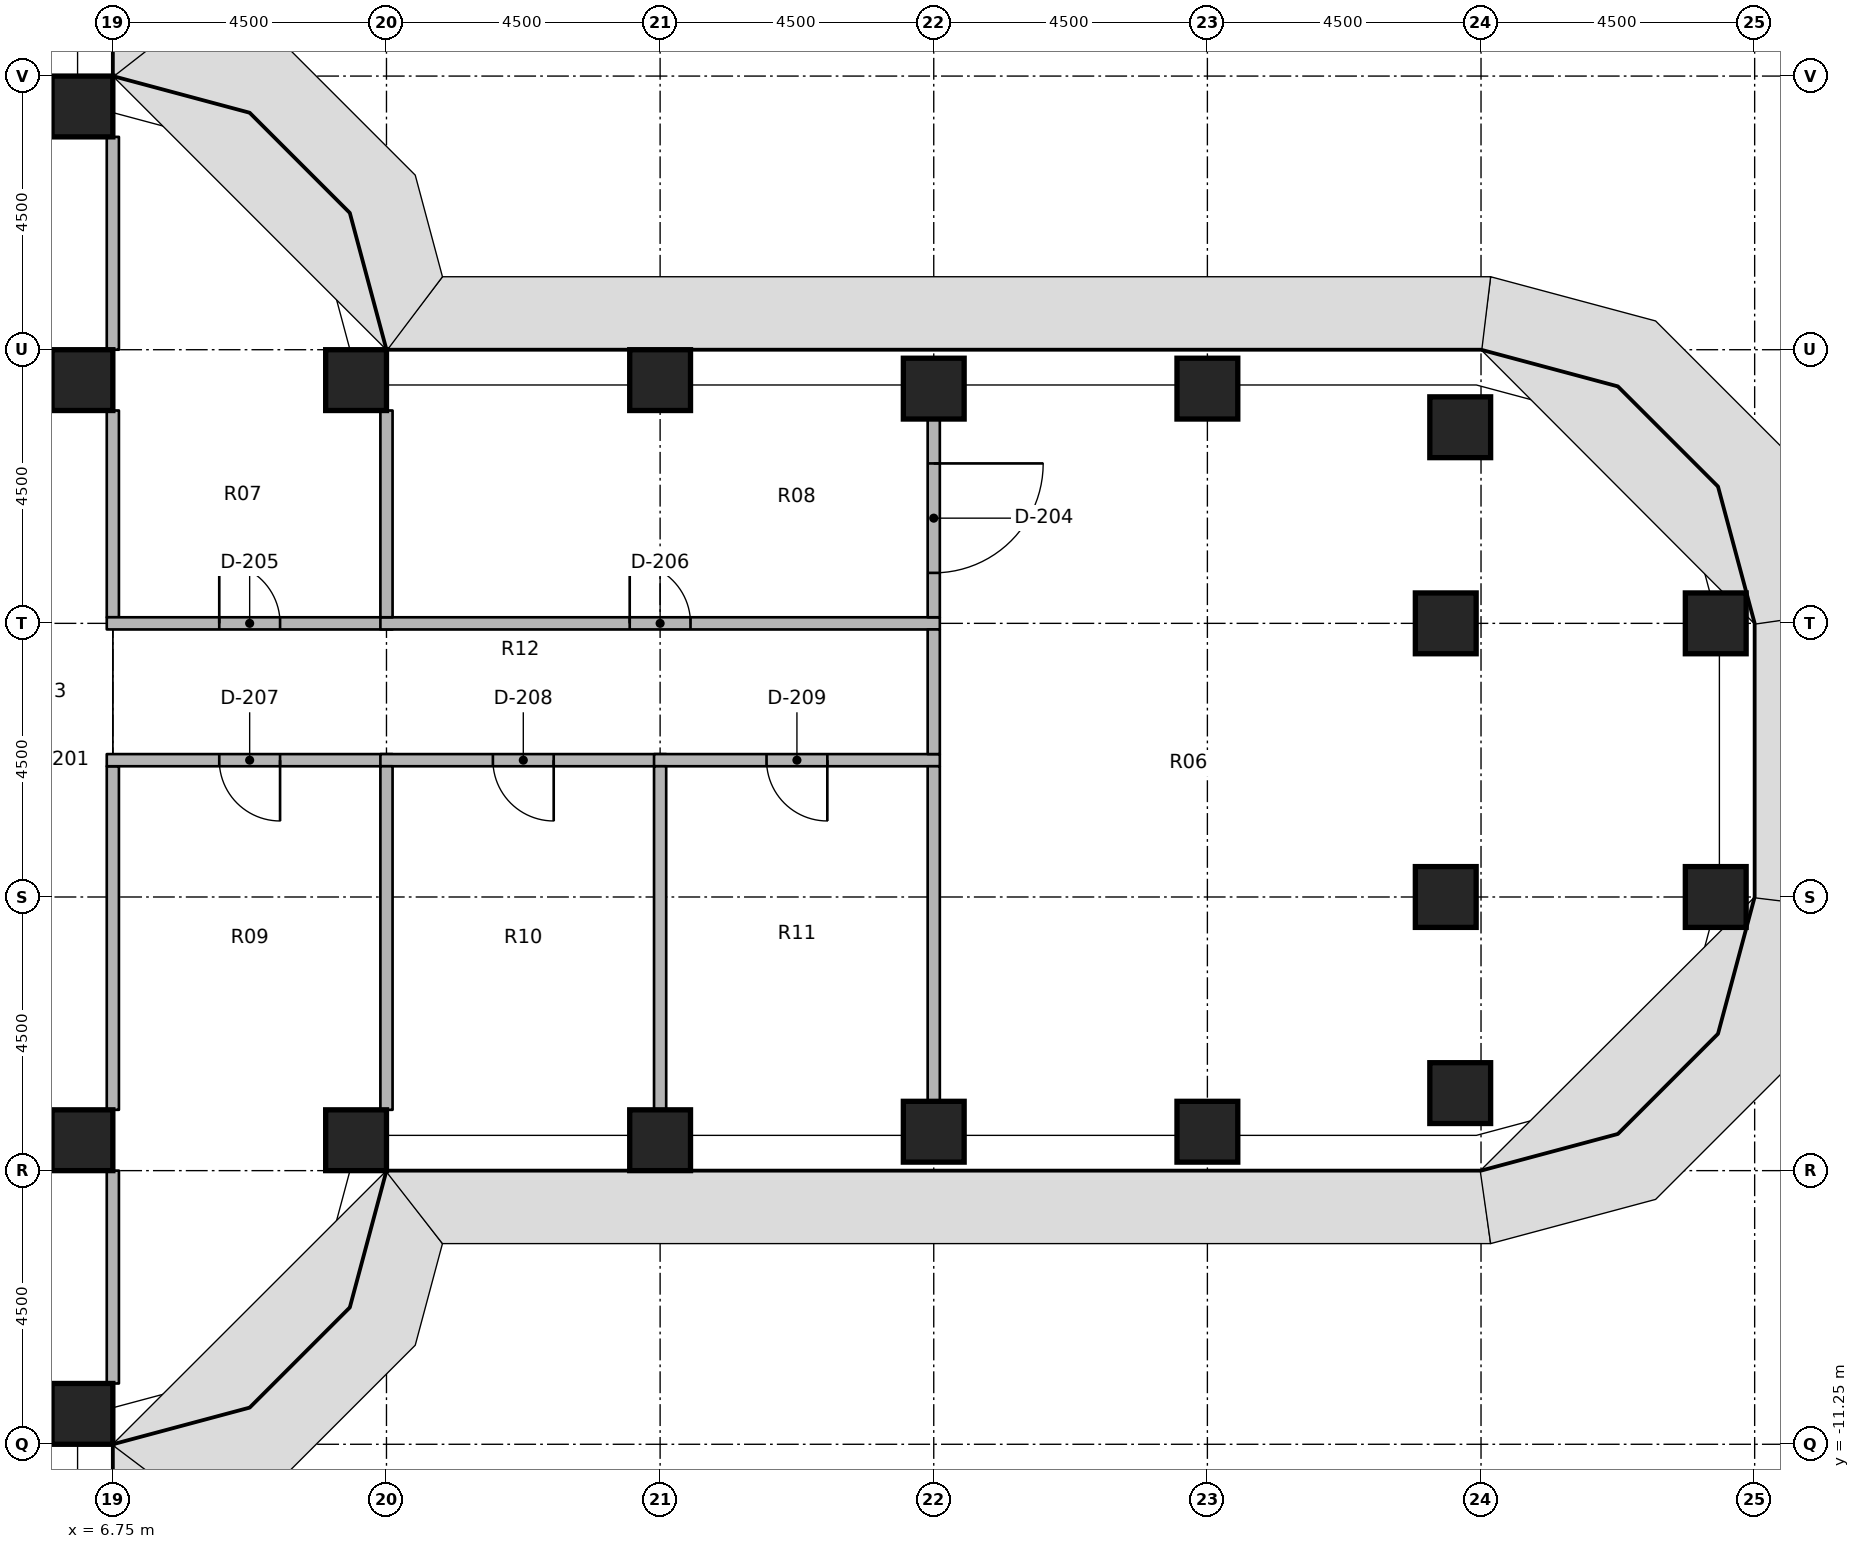
"""IFC4 building model, lengths in metres.
Left out: names, types, materials, properties, quantities, classifications, styles, units other than length and angle.
Written with IfcOpenShell. Run it as: python <this file> out.ifc"""

import sys

from ifc_helpers import new_model, si_unit, direction, frame, frame_2d, origin, origin_2d, place, context, subcontext, project, spatial, rectangle, extrude, element, fill, save


model = new_model("IFC4")
c1 = context("Model", 3, precision=1e-05, world=origin(), true_north=direction((0.0, 1.0)))
c2 = subcontext(c1, "Body", "Model", "MODEL_VIEW")
j1 = project(units=[si_unit("LENGTHUNIT", "METRE"), si_unit("PLANEANGLEUNIT", "RADIAN")], contexts=[c1])
p1 = place(None, origin())
s1 = spatial("IfcSite", under=j1, at=p1, CompositionType="ELEMENT")
p2 = place(p1, origin())
s2 = spatial("IfcBuilding", under=s1, at=p2, CompositionType="ELEMENT")
p3 = place(p2, frame((0.0, 0.0, 31.2)))
s3 = spatial("IfcBuildingStorey", under=s2, at=p3, CompositionType="ELEMENT", Elevation=31.2)
for number, where, z_axis, x_axis in (
    (1, (6.25, -10.75, 0.0), (0.0, 0.0, 1.0), (1.0, 0.0, 0.0)),
    (2, (6.25, -6.25, 0.0), (0.0, 0.0, 1.0), (1.0, 0.0, 0.0)),
    (3, (6.25, 6.25, 0.0), (0.0, 0.0, 1.0), (1.0, 0.0, 0.0)),
    (4, (6.25, 10.75, 0.0), (0.0, 0.0, 1.0), (1.0, 0.0, 0.0)),
    (5, (10.75, -6.25, 0.0), (0.0, 0.0, 1.0), (1.0, 0.0, 0.0)),
    (6, (10.75, 6.25, 0.0), (0.0, 0.0, 1.0), (1.0, 0.0, 0.0)),
    (7, (15.75, -6.25, 0.0), (0.0, 0.0, 1.0), (1.0, 0.0, 0.0)),
    (8, (15.75, 6.25, 0.0), (0.0, 0.0, 1.0), (1.0, 0.0, 0.0)),
    (9, (20.25, -6.11, 0.0), (0.0, 0.0, 1.0), (1.0, 0.0, 0.0)),
    (10, (20.25, 6.11, 0.0), (0.0, 0.0, 1.0), (1.0, 0.0, 0.0)),
    (11, (24.75, -6.11, 0.0), (0.0, 0.0, 1.0), (1.0, 0.0, 0.0)),
    (12, (24.75, 6.11, 0.0), (0.0, 0.0, 1.0), (1.0, 0.0, 0.0)),
    (13, (28.908, -5.475, 0.0), (0.0, 0.0, 1.0), (1.0, 0.0, 0.0)),
    (14, (28.67, -2.25, 0.0), (0.0, 0.0, 1.0), (1.0, 0.0, 0.0)),
    (15, (28.67, 2.25, 0.0), (0.0, 0.0, 1.0), (1.0, 0.0, 0.0)),
    (16, (28.908, 5.475, 0.0), (0.0, 0.0, 1.0), (1.0, 0.0, 0.0)),
    (17, (33.11, -2.25, 0.0), (0.0, 0.0, 1.0), (1.0, 0.0, 0.0)),
    (18, (33.11, 2.25, 0.0), (0.0, 0.0, 1.0), (1.0, 0.0, 0.0)),
):
    element("IfcColumn", number, at=place(p3, frame(where, z_axis=z_axis, x_axis=x_axis)), inside=s3, PredefinedType="COLUMN", context=c2, shape_type="SweptSolid", body=[
        extrude(rectangle(XDim=1.0, YDim=1.0, at=origin_2d()), origin(), (0.0, 0.0, 1.0), 4.05),
    ])
p4 = place(p3, frame((6.75, 2.35, 0.0), z_axis=(0.0, 0.0, 1.0), x_axis=(0.0, 1.0, 0.0)))
e19 = element("IfcWall", 19, at=p4, inside=s3, PredefinedType="PARTITIONING", context=c2, shape_type="SweptSolid", body=[
    extrude(rectangle(XDim=3.4, YDim=0.2, at=frame_2d((1.7, 0.0))), origin(), (0.0, 0.0, 1.0), 3.131),
])
for number, where, z_axis, x_axis in (
    (20, (6.75, 6.75, 0.0), (0.0, 0.0, 1.0), (0.0, 1.0, 0.0)),
    (21, (6.75, -10.25, 0.0), (0.0, 0.0, 1.0), (0.0, 1.0, 0.0)),
):
    element("IfcWall", number, at=place(p3, frame(where, z_axis=z_axis, x_axis=x_axis)), inside=s3, PredefinedType="PARTITIONING", context=c2, shape_type="SweptSolid", body=[
        extrude(rectangle(XDim=3.5, YDim=0.2, at=frame_2d((1.75, 0.0))), origin(), (0.0, 0.0, 1.0), 3.131),
    ])
p5 = place(p3, frame((6.75, -5.75, 0.0), z_axis=(0.0, 0.0, 1.0), x_axis=(0.0, 1.0, 0.0)))
e22 = element("IfcWall", 22, at=p5, inside=s3, PredefinedType="PARTITIONING", context=c2, shape_type="SweptSolid", body=[
    extrude(rectangle(XDim=5.65, YDim=0.2, at=frame_2d((2.825, 0.0))), origin(), (0.0, 0.0, 1.0), 3.131),
])
p6 = place(p3, frame((6.65, 2.25, 0.0), z_axis=(0.0, 0.0, 1.0), x_axis=(1.0, 0.0, 0.0)))
e23 = element("IfcWall", 23, at=p6, inside=s3, PredefinedType="PARTITIONING", context=c2, shape_type="SweptSolid", body=[
    extrude(rectangle(XDim=4.7, YDim=0.2, at=frame_2d((2.35, 0.0))), origin(), (0.0, 0.0, 1.0), 3.131),
])
p7 = place(p6, frame((1.85, 0.0, 0.0)))
e24 = element("IfcOpeningElement", 24, at=p7, cuts=e23, PredefinedType="OPENING", context=c2, shape_type="SweptSolid", body=[
    extrude(rectangle(XDim=1.0, YDim=2.1, at=frame_2d((0.5, 1.05))), frame((0.0, 0.11, 0.0), z_axis=(0.0, -1.0, 0.0), x_axis=(1.0, 0.0, 0.0)), (0.0, 0.0, 1.0), 0.22),
])
p8 = place(p3, frame((11.35, 0.0, 0.0), z_axis=(0.0, 0.0, 1.0), x_axis=(-1.0, 0.0, 0.0)))
e25 = element("IfcWall", 25, at=p8, inside=s3, PredefinedType="PARTITIONING", context=c2, shape_type="SweptSolid", body=[
    extrude(rectangle(XDim=4.7, YDim=0.2, at=frame_2d((2.35, 0.0))), origin(), (0.0, 0.0, 1.0), 3.131),
])
p9 = place(p8, frame((1.85, 0.0, 0.0)))
e26 = element("IfcOpeningElement", 26, at=p9, cuts=e25, PredefinedType="OPENING", context=c2, shape_type="SweptSolid", body=[
    extrude(rectangle(XDim=1.0, YDim=2.1, at=frame_2d((0.5, 1.05))), frame((0.0, 0.11, 0.0), z_axis=(0.0, -1.0, 0.0), x_axis=(1.0, 0.0, 0.0)), (0.0, 0.0, 1.0), 0.22),
])
p10 = place(p3, frame((11.15, 2.25, 0.0), z_axis=(0.0, 0.0, 1.0), x_axis=(1.0, 0.0, 0.0)))
e27 = element("IfcWall", 27, at=p10, inside=s3, PredefinedType="PARTITIONING", context=c2, shape_type="SweptSolid", body=[
    extrude(rectangle(XDim=9.2, YDim=0.2, at=frame_2d((4.6, 0.0))), origin(), (0.0, 0.0, 1.0), 3.131),
])
p11 = place(p10, frame((4.1, 0.0, 0.0)))
e28 = element("IfcOpeningElement", 28, at=p11, cuts=e27, PredefinedType="OPENING", context=c2, shape_type="SweptSolid", body=[
    extrude(rectangle(XDim=1.0, YDim=2.1, at=frame_2d((0.5, 1.05))), frame((0.0, 0.11, 0.0), z_axis=(0.0, -1.0, 0.0), x_axis=(1.0, 0.0, 0.0)), (0.0, 0.0, 1.0), 0.22),
])
p12 = place(p3, frame((15.85, 0.0, 0.0), z_axis=(0.0, 0.0, 1.0), x_axis=(-1.0, 0.0, 0.0)))
e29 = element("IfcWall", 29, at=p12, inside=s3, PredefinedType="PARTITIONING", context=c2, shape_type="SweptSolid", body=[
    extrude(rectangle(XDim=4.7, YDim=0.2, at=frame_2d((2.35, 0.0))), origin(), (0.0, 0.0, 1.0), 3.131),
])
p13 = place(p12, frame((1.85, 0.0, 0.0)))
e30 = element("IfcOpeningElement", 30, at=p13, cuts=e29, PredefinedType="OPENING", context=c2, shape_type="SweptSolid", body=[
    extrude(rectangle(XDim=1.0, YDim=2.1, at=frame_2d((0.5, 1.05))), frame((0.0, 0.11, 0.0), z_axis=(0.0, -1.0, 0.0), x_axis=(1.0, 0.0, 0.0)), (0.0, 0.0, 1.0), 0.22),
])
p14 = place(p3, frame((20.35, 0.0, 0.0), z_axis=(0.0, 0.0, 1.0), x_axis=(-1.0, 0.0, 0.0)))
e31 = element("IfcWall", 31, at=p14, inside=s3, PredefinedType="PARTITIONING", context=c2, shape_type="SweptSolid", body=[
    extrude(rectangle(XDim=4.7, YDim=0.2, at=frame_2d((2.35, 0.0))), origin(), (0.0, 0.0, 1.0), 3.131),
])
p15 = place(p14, frame((1.85, 0.0, 0.0)))
e32 = element("IfcOpeningElement", 32, at=p15, cuts=e31, PredefinedType="OPENING", context=c2, shape_type="SweptSolid", body=[
    extrude(rectangle(XDim=1.0, YDim=2.1, at=frame_2d((0.5, 1.05))), frame((0.0, 0.11, 0.0), z_axis=(0.0, -1.0, 0.0), x_axis=(1.0, 0.0, 0.0)), (0.0, 0.0, 1.0), 0.22),
])
p16 = place(p3, frame((20.25, 0.1, 0.0), z_axis=(0.0, 0.0, 1.0), x_axis=(0.0, 1.0, 0.0)))
e33 = element("IfcWall", 33, at=p16, inside=s3, PredefinedType="PARTITIONING", context=c2, shape_type="SweptSolid", body=[
    extrude(rectangle(XDim=2.05, YDim=0.2, at=frame_2d((1.025, 0.0))), origin(), (0.0, 0.0, 1.0), 3.131),
])
p17 = place(p3, frame((11.25, 2.35, 0.0), z_axis=(0.0, 0.0, 1.0), x_axis=(0.0, 1.0, 0.0)))
e34 = element("IfcWall", 34, at=p17, inside=s3, PredefinedType="PARTITIONING", context=c2, shape_type="SweptSolid", body=[
    extrude(rectangle(XDim=3.4, YDim=0.2, at=frame_2d((1.7, 0.0))), origin(), (0.0, 0.0, 1.0), 3.131),
])
p18 = place(p3, frame((11.25, -5.75, 0.0), z_axis=(0.0, 0.0, 1.0), x_axis=(0.0, 1.0, 0.0)))
e35 = element("IfcWall", 35, at=p18, inside=s3, PredefinedType="PARTITIONING", context=c2, shape_type="SweptSolid", body=[
    extrude(rectangle(XDim=5.65, YDim=0.2, at=frame_2d((2.825, 0.0))), origin(), (0.0, 0.0, 1.0), 3.131),
])
p19 = place(p3, frame((20.25, 5.61, 0.0), z_axis=(0.0, 0.0, 1.0), x_axis=(0.0, -1.0, 0.0)))
e36 = element("IfcWall", 36, at=p19, inside=s3, PredefinedType="PARTITIONING", context=c2, shape_type="SweptSolid", body=[
    extrude(rectangle(XDim=3.26, YDim=0.2, at=frame_2d((1.63, 0.0))), origin(), (0.0, 0.0, 1.0), 3.131),
])
p20 = place(p19, frame((0.73, 0.0, 0.0)))
e37 = element("IfcOpeningElement", 37, at=p20, cuts=e36, PredefinedType="OPENING", context=c2, shape_type="SweptSolid", body=[
    extrude(rectangle(XDim=1.8, YDim=2.1, at=frame_2d((0.9, 1.05))), frame((0.0, 0.11, 0.0), z_axis=(0.0, -1.0, 0.0), x_axis=(1.0, 0.0, 0.0)), (0.0, 0.0, 1.0), 0.22),
])
p21 = place(p3, frame((15.75, -5.75, 0.0), z_axis=(0.0, 0.0, 1.0), x_axis=(0.0, 1.0, 0.0)))
e38 = element("IfcWall", 38, at=p21, inside=s3, PredefinedType="PARTITIONING", context=c2, shape_type="SweptSolid", body=[
    extrude(rectangle(XDim=5.65, YDim=0.2, at=frame_2d((2.825, 0.0))), origin(), (0.0, 0.0, 1.0), 3.131),
])
p22 = place(p3, frame((20.25, -5.61, 0.0), z_axis=(0.0, 0.0, 1.0), x_axis=(0.0, 1.0, 0.0)))
e39 = element("IfcWall", 39, at=p22, inside=s3, PredefinedType="PARTITIONING", context=c2, shape_type="SweptSolid", body=[
    extrude(rectangle(XDim=5.51, YDim=0.2, at=frame_2d((2.755, 0.0))), origin(), (0.0, 0.0, 1.0), 3.131),
])
p23 = place(p20, origin())
e40 = element("IfcDoor", 40, at=p23, inside=s3, OperationType="DOUBLE_DOOR_SINGLE_SWING", PredefinedType="DOOR", context=c2, shape_type="SweptSolid", body=[
    extrude(rectangle(XDim=1.8, YDim=2.1, at=frame_2d((0.9, 1.05))), frame((0.0, 0.025, 0.0), z_axis=(0.0, -1.0, 0.0), x_axis=(1.0, 0.0, 0.0)), (0.0, 0.0, 1.0), 0.05),
])
fill(e37, e40)
p24 = place(p7, origin())
e41 = element("IfcDoor", 41, at=p24, inside=s3, OperationType="SINGLE_SWING_RIGHT", PredefinedType="DOOR", context=c2, shape_type="SweptSolid", body=[
    extrude(rectangle(XDim=1.0, YDim=2.1, at=frame_2d((0.5, 1.05))), frame((0.0, 0.025, 0.0), z_axis=(0.0, -1.0, 0.0), x_axis=(1.0, 0.0, 0.0)), (0.0, 0.0, 1.0), 0.05),
])
fill(e24, e41)
p25 = place(p11, origin())
e42 = element("IfcDoor", 42, at=p25, inside=s3, OperationType="SINGLE_SWING_LEFT", PredefinedType="DOOR", context=c2, shape_type="SweptSolid", body=[
    extrude(rectangle(XDim=1.0, YDim=2.1, at=frame_2d((0.5, 1.05))), frame((0.0, 0.025, 0.0), z_axis=(0.0, -1.0, 0.0), x_axis=(1.0, 0.0, 0.0)), (0.0, 0.0, 1.0), 0.05),
])
fill(e28, e42)
p26 = place(p9, origin())
e43 = element("IfcDoor", 43, at=p26, inside=s3, OperationType="SINGLE_SWING_RIGHT", PredefinedType="DOOR", context=c2, shape_type="SweptSolid", body=[
    extrude(rectangle(XDim=1.0, YDim=2.1, at=frame_2d((0.5, 1.05))), frame((0.0, 0.025, 0.0), z_axis=(0.0, -1.0, 0.0), x_axis=(1.0, 0.0, 0.0)), (0.0, 0.0, 1.0), 0.05),
])
fill(e26, e43)
p27 = place(p13, origin())
e44 = element("IfcDoor", 44, at=p27, inside=s3, OperationType="SINGLE_SWING_RIGHT", PredefinedType="DOOR", context=c2, shape_type="SweptSolid", body=[
    extrude(rectangle(XDim=1.0, YDim=2.1, at=frame_2d((0.5, 1.05))), frame((0.0, 0.025, 0.0), z_axis=(0.0, -1.0, 0.0), x_axis=(1.0, 0.0, 0.0)), (0.0, 0.0, 1.0), 0.05),
])
fill(e30, e44)
p28 = place(p15, origin())
e45 = element("IfcDoor", 45, at=p28, inside=s3, OperationType="SINGLE_SWING_RIGHT", PredefinedType="DOOR", context=c2, shape_type="SweptSolid", body=[
    extrude(rectangle(XDim=1.0, YDim=2.1, at=frame_2d((0.5, 1.05))), frame((0.0, 0.025, 0.0), z_axis=(0.0, -1.0, 0.0), x_axis=(1.0, 0.0, 0.0)), (0.0, 0.0, 1.0), 0.05),
])
fill(e32, e45)
save(model, sys.argv[1])
